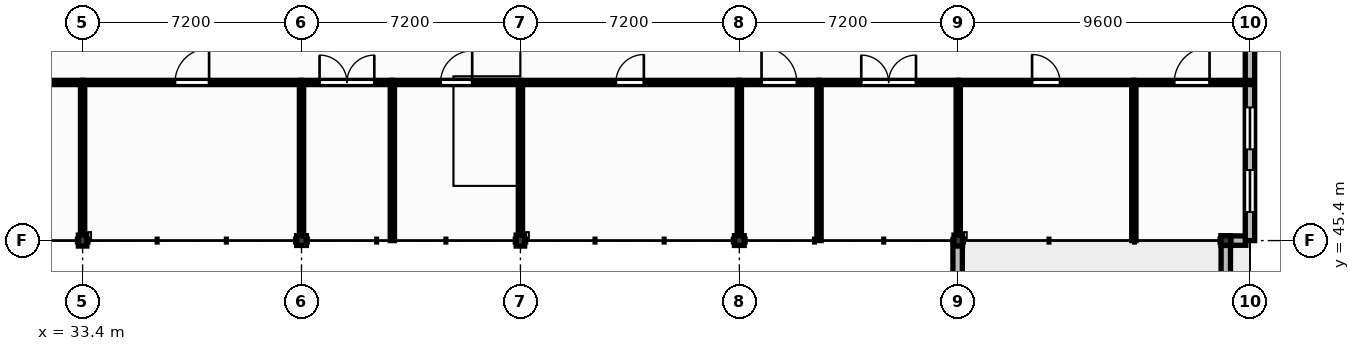
"""IFC4 building model, lengths in metres.
Left out: names, types, materials, properties, quantities, classifications, styles, units other than length and angle.
Written with IfcOpenShell. Run it as: python <this file> out.ifc"""

import sys

from ifc_helpers import new_model, si_unit, direction, frame, frame_2d, origin, origin_2d, place, context, subcontext, project, spatial, polyline, rectangle, outline, extrude, element, fill, save


model = new_model("IFC4")
c1 = context("Model", 3, precision=1e-05, world=origin(), true_north=direction((0.0, 1.0)))
c2 = subcontext(c1, "Body", "Model", "MODEL_VIEW")
j1 = project(units=[si_unit("LENGTHUNIT", "METRE"), si_unit("PLANEANGLEUNIT", "RADIAN")], contexts=[c1])
p1 = place(None, origin())
s1 = spatial("IfcSite", under=j1, at=p1, CompositionType="ELEMENT")
p2 = place(p1, origin())
s2 = spatial("IfcBuilding", under=s1, at=p2, CompositionType="ELEMENT")
p3 = place(p2, frame((0.0, 0.0, 9.0)))
s3 = spatial("IfcBuildingStorey", under=s2, at=p3, CompositionType="ELEMENT", Elevation=9.0)
p4 = place(p3, frame((33.4, 45.4, 0.0), z_axis=(0.0, 0.0, 1.0), x_axis=(1.0, 0.0, 0.0)))
e1 = element("IfcColumn", 1, at=p4, inside=s3, PredefinedType="COLUMN", context=c2, shape_type="SweptSolid", body=[
    extrude(rectangle(XDim=0.28, YDim=0.36, at=origin_2d()), origin(), (0.0, 0.0, 1.0), 3.99),
])
p5 = place(p3, frame((40.6, 45.4, 0.0), z_axis=(0.0, 0.0, 1.0), x_axis=(1.0, 0.0, 0.0)))
e2 = element("IfcColumn", 2, at=p5, inside=s3, PredefinedType="COLUMN", context=c2, shape_type="SweptSolid", body=[
    extrude(rectangle(XDim=0.32, YDim=0.32, at=origin_2d()), origin(), (0.0, 0.0, 1.0), 3.99),
])
p6 = place(p3, frame((47.8, 45.4, 0.0), z_axis=(0.0, 0.0, 1.0), x_axis=(1.0, 0.0, 0.0)))
e3 = element("IfcColumn", 3, at=p6, inside=s3, PredefinedType="COLUMN", context=c2, shape_type="SweptSolid", body=[
    extrude(rectangle(XDim=0.28, YDim=0.36, at=origin_2d()), origin(), (0.0, 0.0, 1.0), 3.99),
])
p7 = place(p3, frame((55.0, 45.4, 0.0), z_axis=(0.0, 0.0, 1.0), x_axis=(1.0, 0.0, 0.0)))
e4 = element("IfcColumn", 4, at=p7, inside=s3, PredefinedType="COLUMN", context=c2, shape_type="SweptSolid", body=[
    extrude(rectangle(XDim=0.32, YDim=0.32, at=origin_2d()), origin(), (0.0, 0.0, 1.0), 3.99),
])
p8 = place(p3, frame((62.2, 45.4, 0.0), z_axis=(0.0, 0.0, 1.0), x_axis=(1.0, 0.0, 0.0)))
e5 = element("IfcColumn", 5, at=p8, inside=s3, PredefinedType="COLUMN", context=c2, shape_type="SweptSolid", body=[
    extrude(rectangle(XDim=0.28, YDim=0.36, at=origin_2d()), origin(), (0.0, 0.0, 1.0), 3.98),
])
p9 = place(p3, frame((71.0, 45.4, 0.0), z_axis=(0.0, 0.0, 1.0), x_axis=(1.0, 0.0, 0.0)))
e6 = element("IfcColumn", 6, at=p9, inside=s3, PredefinedType="COLUMN", context=c2, shape_type="SweptSolid", body=[
    extrude(rectangle(XDim=0.32, YDim=0.32, at=origin_2d()), origin(), (0.0, 0.0, 1.0), 3.98),
])
p10 = place(p3, frame((71.16, 45.4, 0.0), z_axis=(0.0, 0.0, 1.0), x_axis=(1.0, 0.0, 0.0)))
e7 = element("IfcWall", 7, at=p10, inside=s3, PredefinedType="SOLIDWALL", context=c2, shape_type="SweptSolid", body=[
    extrude(rectangle(XDim=0.5, YDim=0.31, at=frame_2d((0.25, 0.0))), origin(), (0.0, 0.0, 1.0), 3.98),
])
p11 = place(p3, frame((71.795, 45.4, 0.0), z_axis=(0.0, 0.0, 1.0), x_axis=(0.0, 1.0, 0.0)))
e8 = element("IfcWall", 8, at=p11, inside=s3, PredefinedType="SOLIDWALL", context=c2, shape_type="SweptSolid", body=[
    extrude(rectangle(XDim=7.2, YDim=0.31, at=frame_2d((3.6, 0.0))), origin(), (0.0, 0.0, 1.0), 3.98),
])
p12 = place(p11, frame((0.94, 0.0, 1.0)))
e9 = element("IfcOpeningElement", 9, at=p12, cuts=e8, PredefinedType="OPENING", context=c2, shape_type="SweptSolid", body=[
    extrude(rectangle(XDim=1.38, YDim=1.8, at=frame_2d((0.69, 0.9))), frame((0.0, 0.165, 0.0), z_axis=(0.0, -1.0, 0.0), x_axis=(1.0, 0.0, 0.0)), (0.0, 0.0, 1.0), 0.33),
])
p13 = place(p11, frame((3.0, 0.0, 1.0)))
e10 = element("IfcOpeningElement", 10, at=p13, cuts=e8, PredefinedType="OPENING", context=c2, shape_type="SweptSolid", body=[
    extrude(rectangle(XDim=1.38, YDim=1.8, at=frame_2d((0.69, 0.9))), frame((0.0, 0.165, 0.0), z_axis=(0.0, -1.0, 0.0), x_axis=(1.0, 0.0, 0.0)), (0.0, 0.0, 1.0), 0.33),
])
for number, where, z_axis, x_axis in (
    (11, (62.18, 36.8, 0.0), (0.0, 0.0, 1.0), (0.0, 1.0, 0.0)),
    (12, (71.0, 36.8, 0.0), (0.0, 0.0, 1.0), (0.0, 1.0, 0.0)),
):
    element("IfcWall", number, at=place(p3, frame(where, z_axis=z_axis, x_axis=x_axis)), inside=s3, PredefinedType="SOLIDWALL", context=c2, shape_type="SweptSolid", body=[
        extrude(outline(polyline([(0.0, 0.0), (8.6, 0.0), (8.6, 0.05), (4.3, 2.16), (0.0, 0.05), (0.0, 0.0)])), frame((0.0, 0.155, 0.0), z_axis=(0.0, -1.0, 0.0), x_axis=(1.0, 0.0, 0.0)), (0.0, 0.0, 1.0), 0.31),
    ])
p14 = place(p3, frame((29.555, 50.6, 0.0), z_axis=(0.0, 0.0, 1.0), x_axis=(1.0, 0.0, 0.0)))
e13 = element("IfcWall", 13, at=p14, inside=s3, PredefinedType="PARTITIONING", context=c2, shape_type="SweptSolid", body=[
    extrude(rectangle(XDim=3.845, YDim=0.14, at=frame_2d((1.922, 0.0))), origin(), (0.0, 0.0, 1.0), 3.96),
])
p15 = place(p14, frame((1.403, 0.0, 0.0)))
e14 = element("IfcOpeningElement", 14, at=p15, cuts=e13, PredefinedType="OPENING", context=c2, shape_type="SweptSolid", body=[
    extrude(rectangle(XDim=1.04, YDim=2.1, at=frame_2d((0.52, 1.05))), frame((0.0, 0.08, 0.0), z_axis=(0.0, -1.0, 0.0), x_axis=(1.0, 0.0, 0.0)), (0.0, 0.0, 1.0), 0.16),
])
p16 = place(p3, frame((33.4, 45.58, 0.0), z_axis=(0.0, 0.0, 1.0), x_axis=(0.0, 1.0, 0.0)))
e15 = element("IfcWall", 15, at=p16, inside=s3, PredefinedType="PARTITIONING", context=c2, shape_type="SweptSolid", body=[
    extrude(rectangle(XDim=4.95, YDim=0.14, at=frame_2d((2.475, 0.0))), origin(), (0.0, 0.0, 1.0), 3.47),
])
p17 = place(p3, frame((33.4, 50.6, 0.0), z_axis=(0.0, 0.0, 1.0), x_axis=(1.0, 0.0, 0.0)))
e16 = element("IfcWall", 16, at=p17, inside=s3, PredefinedType="PARTITIONING", context=c2, shape_type="SweptSolid", body=[
    extrude(rectangle(XDim=7.2, YDim=0.14, at=frame_2d((3.6, 0.0))), origin(), (0.0, 0.0, 1.0), 3.96),
])
p18 = place(p17, frame((3.04, 0.0, 0.0)))
e17 = element("IfcOpeningElement", 17, at=p18, cuts=e16, PredefinedType="OPENING", context=c2, shape_type="SweptSolid", body=[
    extrude(rectangle(XDim=1.12, YDim=2.15, at=frame_2d((0.56, 1.075))), frame((0.0, 0.08, 0.0), z_axis=(0.0, -1.0, 0.0), x_axis=(1.0, 0.0, 0.0)), (0.0, 0.0, 1.0), 0.16),
])
p19 = place(p3, frame((40.6, 45.56, 0.0), z_axis=(0.0, 0.0, 1.0), x_axis=(0.0, 1.0, 0.0)))
e18 = element("IfcWall", 18, at=p19, inside=s3, PredefinedType="PARTITIONING", context=c2, shape_type="SweptSolid", body=[
    extrude(rectangle(XDim=4.97, YDim=0.14, at=frame_2d((2.485, 0.0))), origin(), (0.0, 0.0, 1.0), 3.47),
])
p20 = place(p3, frame((40.6, 50.6, 0.0), z_axis=(0.0, 0.0, 1.0), x_axis=(1.0, 0.0, 0.0)))
e19 = element("IfcWall", 19, at=p20, inside=s3, PredefinedType="PARTITIONING", context=c2, shape_type="SweptSolid", body=[
    extrude(rectangle(XDim=2.988, YDim=0.14, at=frame_2d((1.494, 0.0))), origin(), (0.0, 0.0, 1.0), 3.96),
])
p21 = place(p20, frame((0.594, 0.0, 0.0)))
e20 = element("IfcOpeningElement", 20, at=p21, cuts=e19, PredefinedType="OPENING", context=c2, shape_type="SweptSolid", body=[
    extrude(rectangle(XDim=1.8, YDim=2.3, at=frame_2d((0.9, 1.15))), frame((0.0, 0.08, 0.0), z_axis=(0.0, -1.0, 0.0), x_axis=(1.0, 0.0, 0.0)), (0.0, 0.0, 1.0), 0.16),
])
p22 = place(p3, frame((43.588, 45.4, 0.0), z_axis=(0.0, 0.0, 1.0), x_axis=(0.0, 1.0, 0.0)))
e21 = element("IfcWall", 21, at=p22, inside=s3, PredefinedType="PARTITIONING", context=c2, shape_type="SweptSolid", body=[
    extrude(rectangle(XDim=5.13, YDim=0.14, at=frame_2d((2.565, 0.0))), origin(), (0.0, 0.0, 1.0), 3.96),
])
p23 = place(p3, frame((43.588, 50.6, 0.0), z_axis=(0.0, 0.0, 1.0), x_axis=(1.0, 0.0, 0.0)))
e22 = element("IfcWall", 22, at=p23, inside=s3, PredefinedType="PARTITIONING", context=c2, shape_type="SweptSolid", body=[
    extrude(rectangle(XDim=4.212, YDim=0.14, at=frame_2d((2.106, 0.0))), origin(), (0.0, 0.0, 1.0), 3.96),
])
p24 = place(p23, frame((1.586, 0.0, 0.0)))
e23 = element("IfcOpeningElement", 23, at=p24, cuts=e22, PredefinedType="OPENING", context=c2, shape_type="SweptSolid", body=[
    extrude(rectangle(XDim=1.04, YDim=2.1, at=frame_2d((0.52, 1.05))), frame((0.0, 0.08, 0.0), z_axis=(0.0, -1.0, 0.0), x_axis=(1.0, 0.0, 0.0)), (0.0, 0.0, 1.0), 0.16),
])
p25 = place(p3, frame((47.8, 45.58, 0.0), z_axis=(0.0, 0.0, 1.0), x_axis=(0.0, 1.0, 0.0)))
e24 = element("IfcWall", 24, at=p25, inside=s3, PredefinedType="PARTITIONING", context=c2, shape_type="SweptSolid", body=[
    extrude(rectangle(XDim=4.95, YDim=0.14, at=frame_2d((2.475, 0.0))), origin(), (0.0, 0.0, 1.0), 3.47),
])
p26 = place(p3, frame((47.8, 50.6, 0.0), z_axis=(0.0, 0.0, 1.0), x_axis=(1.0, 0.0, 0.0)))
e25 = element("IfcWall", 25, at=p26, inside=s3, PredefinedType="PARTITIONING", context=c2, shape_type="SweptSolid", body=[
    extrude(rectangle(XDim=7.2, YDim=0.14, at=frame_2d((3.6, 0.0))), origin(), (0.0, 0.0, 1.0), 3.96),
])
p27 = place(p26, frame((3.14, 0.0, 0.0)))
e26 = element("IfcOpeningElement", 26, at=p27, cuts=e25, PredefinedType="OPENING", context=c2, shape_type="SweptSolid", body=[
    extrude(rectangle(XDim=0.92, YDim=2.1, at=frame_2d((0.46, 1.05))), frame((0.0, 0.08, 0.0), z_axis=(0.0, -1.0, 0.0), x_axis=(1.0, 0.0, 0.0)), (0.0, 0.0, 1.0), 0.16),
])
p28 = place(p3, frame((55.0, 45.56, 0.0), z_axis=(0.0, 0.0, 1.0), x_axis=(0.0, 1.0, 0.0)))
e27 = element("IfcWall", 27, at=p28, inside=s3, PredefinedType="PARTITIONING", context=c2, shape_type="SweptSolid", body=[
    extrude(rectangle(XDim=4.97, YDim=0.14, at=frame_2d((2.485, 0.0))), origin(), (0.0, 0.0, 1.0), 3.47),
])
p29 = place(p3, frame((55.0, 50.6, 0.0), z_axis=(0.0, 0.0, 1.0), x_axis=(1.0, 0.0, 0.0)))
e28 = element("IfcWall", 28, at=p29, inside=s3, PredefinedType="PARTITIONING", context=c2, shape_type="SweptSolid", body=[
    extrude(rectangle(XDim=2.621, YDim=0.14, at=frame_2d((1.311, 0.0))), origin(), (0.0, 0.0, 1.0), 3.96),
])
p30 = place(p29, frame((0.73, 0.0, 0.0)))
e29 = element("IfcOpeningElement", 29, at=p30, cuts=e28, PredefinedType="OPENING", context=c2, shape_type="SweptSolid", body=[
    extrude(rectangle(XDim=1.16, YDim=2.1, at=frame_2d((0.58, 1.05))), frame((0.0, 0.08, 0.0), z_axis=(0.0, -1.0, 0.0), x_axis=(1.0, 0.0, 0.0)), (0.0, 0.0, 1.0), 0.16),
])
p31 = place(p3, frame((57.621, 45.4, 0.0), z_axis=(0.0, 0.0, 1.0), x_axis=(0.0, 1.0, 0.0)))
e30 = element("IfcWall", 30, at=p31, inside=s3, PredefinedType="PARTITIONING", context=c2, shape_type="SweptSolid", body=[
    extrude(rectangle(XDim=5.13, YDim=0.14, at=frame_2d((2.565, 0.0))), origin(), (0.0, 0.0, 1.0), 3.96),
])
p32 = place(p3, frame((57.621, 50.6, 0.0), z_axis=(0.0, 0.0, 1.0), x_axis=(1.0, 0.0, 0.0)))
e31 = element("IfcWall", 31, at=p32, inside=s3, PredefinedType="PARTITIONING", context=c2, shape_type="SweptSolid", body=[
    extrude(rectangle(XDim=4.579, YDim=0.14, at=frame_2d((2.29, 0.0))), origin(), (0.0, 0.0, 1.0), 3.96),
])
p33 = place(p32, frame((1.389, 0.0, 0.0)))
e32 = element("IfcOpeningElement", 32, at=p33, cuts=e31, PredefinedType="OPENING", context=c2, shape_type="SweptSolid", body=[
    extrude(rectangle(XDim=1.8, YDim=2.3, at=frame_2d((0.9, 1.15))), frame((0.0, 0.08, 0.0), z_axis=(0.0, -1.0, 0.0), x_axis=(1.0, 0.0, 0.0)), (0.0, 0.0, 1.0), 0.16),
])
p34 = place(p3, frame((62.2, 45.58, 0.0), z_axis=(0.0, 0.0, 1.0), x_axis=(0.0, 1.0, 0.0)))
e33 = element("IfcWall", 33, at=p34, inside=s3, PredefinedType="PARTITIONING", context=c2, shape_type="SweptSolid", body=[
    extrude(rectangle(XDim=4.95, YDim=0.14, at=frame_2d((2.475, 0.0))), origin(), (0.0, 0.0, 1.0), 3.52),
])
p35 = place(p3, frame((62.2, 50.6, 0.0), z_axis=(0.0, 0.0, 1.0), x_axis=(1.0, 0.0, 0.0)))
e34 = element("IfcWall", 34, at=p35, inside=s3, PredefinedType="PARTITIONING", context=c2, shape_type="SweptSolid", body=[
    extrude(rectangle(XDim=5.776, YDim=0.14, at=frame_2d((2.888, 0.0))), origin(), (0.0, 0.0, 1.0), 3.96),
])
p36 = place(p35, frame((2.428, 0.0, 0.0)))
e35 = element("IfcOpeningElement", 35, at=p36, cuts=e34, PredefinedType="OPENING", context=c2, shape_type="SweptSolid", body=[
    extrude(rectangle(XDim=0.92, YDim=2.1, at=frame_2d((0.46, 1.05))), frame((0.0, 0.08, 0.0), z_axis=(0.0, -1.0, 0.0), x_axis=(1.0, 0.0, 0.0)), (0.0, 0.0, 1.0), 0.16),
])
p37 = place(p3, frame((67.976, 45.4, 0.0), z_axis=(0.0, 0.0, 1.0), x_axis=(0.0, 1.0, 0.0)))
e36 = element("IfcWall", 36, at=p37, inside=s3, PredefinedType="PARTITIONING", context=c2, shape_type="SweptSolid", body=[
    extrude(rectangle(XDim=5.13, YDim=0.14, at=frame_2d((2.565, 0.0))), origin(), (0.0, 0.0, 1.0), 3.96),
])
p38 = place(p3, frame((67.976, 50.6, 0.0), z_axis=(0.0, 0.0, 1.0), x_axis=(1.0, 0.0, 0.0)))
e37 = element("IfcWall", 37, at=p38, inside=s3, PredefinedType="PARTITIONING", context=c2, shape_type="SweptSolid", body=[
    extrude(rectangle(XDim=3.819, YDim=0.14, at=frame_2d((1.909, 0.0))), origin(), (0.0, 0.0, 1.0), 3.96),
])
p39 = place(p38, frame((1.33, 0.0, 0.0)))
e38 = element("IfcOpeningElement", 38, at=p39, cuts=e37, PredefinedType="OPENING", context=c2, shape_type="SweptSolid", body=[
    extrude(rectangle(XDim=1.16, YDim=2.1, at=frame_2d((0.58, 1.05))), frame((0.0, 0.08, 0.0), z_axis=(0.0, -1.0, 0.0), x_axis=(1.0, 0.0, 0.0)), (0.0, 0.0, 1.0), 0.16),
])
p40 = place(p12, origin())
e39 = element("IfcWindow", 39, at=p40, inside=s3, PartitioningType="SINGLE_PANEL", PredefinedType="WINDOW", context=c2, shape_type="SweptSolid", body=[
    extrude(rectangle(XDim=1.38, YDim=1.8, at=frame_2d((0.69, 0.9))), frame((0.0, 0.03, 0.0), z_axis=(0.0, -1.0, 0.0), x_axis=(1.0, 0.0, 0.0)), (0.0, 0.0, 1.0), 0.06),
])
fill(e9, e39)
p41 = place(p13, origin())
e40 = element("IfcWindow", 40, at=p41, inside=s3, PartitioningType="SINGLE_PANEL", PredefinedType="WINDOW", context=c2, shape_type="SweptSolid", body=[
    extrude(rectangle(XDim=1.38, YDim=1.8, at=frame_2d((0.69, 0.9))), frame((0.0, 0.03, 0.0), z_axis=(0.0, -1.0, 0.0), x_axis=(1.0, 0.0, 0.0)), (0.0, 0.0, 1.0), 0.06),
])
fill(e10, e40)
p42 = place(p18, origin())
e41 = element("IfcDoor", 41, at=p42, inside=s3, OperationType="SINGLE_SWING_RIGHT", PredefinedType="DOOR", context=c2, shape_type="SweptSolid", body=[
    extrude(rectangle(XDim=1.12, YDim=2.15, at=frame_2d((0.56, 1.075))), frame((0.0, 0.025, 0.0), z_axis=(0.0, -1.0, 0.0), x_axis=(1.0, 0.0, 0.0)), (0.0, 0.0, 1.0), 0.05),
])
fill(e17, e41)
p43 = place(p21, origin())
e42 = element("IfcDoor", 42, at=p43, inside=s3, OperationType="DOUBLE_DOOR_SINGLE_SWING", PredefinedType="DOOR", context=c2, shape_type="SweptSolid", body=[
    extrude(rectangle(XDim=1.8, YDim=2.3, at=frame_2d((0.9, 1.15))), frame((0.0, 0.025, 0.0), z_axis=(0.0, -1.0, 0.0), x_axis=(1.0, 0.0, 0.0)), (0.0, 0.0, 1.0), 0.05),
])
fill(e20, e42)
p44 = place(p24, origin())
e43 = element("IfcDoor", 43, at=p44, inside=s3, OperationType="SINGLE_SWING_RIGHT", PredefinedType="DOOR", context=c2, shape_type="SweptSolid", body=[
    extrude(rectangle(XDim=1.04, YDim=2.1, at=frame_2d((0.52, 1.05))), frame((0.0, 0.025, 0.0), z_axis=(0.0, -1.0, 0.0), x_axis=(1.0, 0.0, 0.0)), (0.0, 0.0, 1.0), 0.05),
])
fill(e23, e43)
p45 = place(p27, origin())
e44 = element("IfcDoor", 44, at=p45, inside=s3, OperationType="SINGLE_SWING_RIGHT", PredefinedType="DOOR", context=c2, shape_type="SweptSolid", body=[
    extrude(rectangle(XDim=0.92, YDim=2.1, at=frame_2d((0.46, 1.05))), frame((0.0, 0.025, 0.0), z_axis=(0.0, -1.0, 0.0), x_axis=(1.0, 0.0, 0.0)), (0.0, 0.0, 1.0), 0.05),
])
fill(e26, e44)
p46 = place(p30, origin())
e45 = element("IfcDoor", 45, at=p46, inside=s3, OperationType="SINGLE_SWING_LEFT", PredefinedType="DOOR", context=c2, shape_type="SweptSolid", body=[
    extrude(rectangle(XDim=1.16, YDim=2.1, at=frame_2d((0.58, 1.05))), frame((0.0, 0.025, 0.0), z_axis=(0.0, -1.0, 0.0), x_axis=(1.0, 0.0, 0.0)), (0.0, 0.0, 1.0), 0.05),
])
fill(e29, e45)
p47 = place(p33, origin())
e46 = element("IfcDoor", 46, at=p47, inside=s3, OperationType="DOUBLE_DOOR_SINGLE_SWING", PredefinedType="DOOR", context=c2, shape_type="SweptSolid", body=[
    extrude(rectangle(XDim=1.8, YDim=2.3, at=frame_2d((0.9, 1.15))), frame((0.0, 0.025, 0.0), z_axis=(0.0, -1.0, 0.0), x_axis=(1.0, 0.0, 0.0)), (0.0, 0.0, 1.0), 0.05),
])
fill(e32, e46)
p48 = place(p36, origin())
e47 = element("IfcDoor", 47, at=p48, inside=s3, OperationType="SINGLE_SWING_LEFT", PredefinedType="DOOR", context=c2, shape_type="SweptSolid", body=[
    extrude(rectangle(XDim=0.92, YDim=2.1, at=frame_2d((0.46, 1.05))), frame((0.0, 0.025, 0.0), z_axis=(0.0, -1.0, 0.0), x_axis=(1.0, 0.0, 0.0)), (0.0, 0.0, 1.0), 0.05),
])
fill(e35, e47)
p49 = place(p39, origin())
e48 = element("IfcDoor", 48, at=p49, inside=s3, OperationType="SINGLE_SWING_RIGHT", PredefinedType="DOOR", context=c2, shape_type="SweptSolid", body=[
    extrude(rectangle(XDim=1.16, YDim=2.1, at=frame_2d((0.58, 1.05))), frame((0.0, 0.025, 0.0), z_axis=(0.0, -1.0, 0.0), x_axis=(1.0, 0.0, 0.0)), (0.0, 0.0, 1.0), 0.05),
])
fill(e38, e48)
save(model, sys.argv[1])
